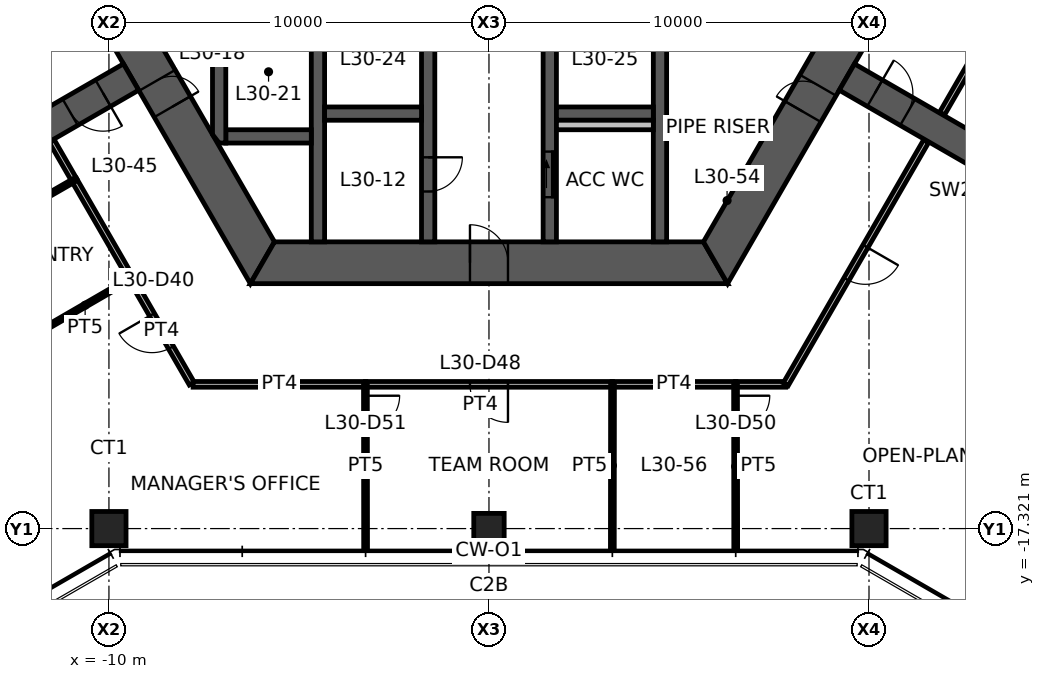
"""IFC4 building model, lengths in metres.
Left out: names, types, materials, properties, quantities, classifications, styles, units other than length and angle.
Written with IfcOpenShell. Run it as: python <this file> out.ifc"""

import sys

from ifc_helpers import new_model, si_unit, direction, frame, frame_2d, origin, origin_2d, place, context, subcontext, project, spatial, polyline, rectangle, hollow_rectangle, outline, extrude, element, fill, save


model = new_model("IFC4")
c1 = context("Model", 3, precision=1e-05, world=origin(), true_north=direction((0.0, 1.0)))
c2 = subcontext(c1, "Body", "Model", "MODEL_VIEW")
j1 = project(units=[si_unit("LENGTHUNIT", "METRE"), si_unit("PLANEANGLEUNIT", "RADIAN")], contexts=[c1])
p1 = place(None, origin())
s1 = spatial("IfcSite", under=j1, at=p1, CompositionType="ELEMENT")
p2 = place(p1, origin())
s2 = spatial("IfcBuilding", under=s1, at=p2, CompositionType="ELEMENT")
p3 = place(p2, frame((0.0, 0.0, 119.7)))
s3 = spatial("IfcBuildingStorey", under=s2, at=p3, CompositionType="ELEMENT", Elevation=119.7)
for number, where, z_axis, x_axis in (
    (1, (-10.0, -17.321, 0.0), (0.0, 0.0, 1.0), (1.0, 0.0, 0.0)),
    (2, (10.0, -17.321, 0.0), (0.0, 0.0, 1.0), (1.0, 0.0, 0.0)),
):
    element("IfcColumn", number, at=place(p3, frame(where, z_axis=z_axis, x_axis=x_axis)), inside=s3, PredefinedType="COLUMN", context=c2, shape_type="SweptSolid", body=[
        extrude(hollow_rectangle(XDim=0.9, YDim=0.9, WallThickness=0.07, at=origin_2d()), origin(), (0.0, 0.0, 1.0), 3.9),
    ])
p4 = place(p3, frame((0.0, -17.321, 0.0), z_axis=(0.0, 0.0, 1.0), x_axis=(1.0, 0.0, 0.0)))
e3 = element("IfcColumn", 3, at=p4, inside=s3, PredefinedType="COLUMN", context=c2, shape_type="SweptSolid", body=[
    extrude(hollow_rectangle(XDim=0.8, YDim=0.8, WallThickness=0.045, at=origin_2d()), origin(), (0.0, 0.0, 1.0), 3.9),
])
p5 = place(p3, frame((-11.922, 0.0, 0.0), z_axis=(0.0, 0.0, 1.0), x_axis=(0.500004296715, -0.866022923061, 0.0)))
e4 = element("IfcWall", 4, at=p5, inside=s3, PredefinedType="SHEAR", context=c2, shape_type="SweptSolid", body=[
    extrude(outline(polyline([(-0.318, -0.55), (6.381, -0.55), (7.181, -0.55), (12.24, -0.55), (11.605, 0.55), (7.181, 0.55), (6.381, 0.55), (0.318, 0.55), (-0.318, -0.55)])), origin(), (0.0, 0.0, 1.0), 3.9),
])
p6 = place(p5, frame((6.381, 0.0, 0.0)))
e5 = element("IfcOpeningElement", 5, at=p6, cuts=e4, PredefinedType="OPENING", context=c2, shape_type="SweptSolid", body=[
    extrude(rectangle(XDim=0.8, YDim=2.1, at=frame_2d((0.4, 1.05))), frame((0.0, 0.56, 0.0), z_axis=(0.0, -1.0, 0.0), x_axis=(1.0, 0.0, 0.0)), (0.0, 0.0, 1.0), 1.12),
])
p7 = place(p3, frame((-5.961, -10.325, 0.0), z_axis=(0.0, 0.0, 1.0), x_axis=(1.0, 0.0, 0.0)))
e6 = element("IfcWall", 6, at=p7, inside=s3, PredefinedType="SHEAR", context=c2, shape_type="SweptSolid", body=[
    extrude(outline(polyline([(-0.318, -0.55), (5.461, -0.55), (6.461, -0.55), (12.24, -0.55), (11.605, 0.55), (6.461, 0.55), (5.461, 0.55), (0.318, 0.55), (-0.318, -0.55)])), origin(), (0.0, 0.0, 1.0), 3.9),
])
p8 = place(p7, frame((5.461, 0.0, 0.0)))
e7 = element("IfcOpeningElement", 7, at=p8, cuts=e6, PredefinedType="OPENING", context=c2, shape_type="SweptSolid", body=[
    extrude(rectangle(XDim=1.0, YDim=2.1, at=frame_2d((0.5, 1.05))), frame((0.0, 0.56, 0.0), z_axis=(0.0, -1.0, 0.0), x_axis=(1.0, 0.0, 0.0)), (0.0, 0.0, 1.0), 1.12),
])
p9 = place(p3, frame((5.961, -10.325, 0.0), z_axis=(0.0, 0.0, 1.0), x_axis=(0.500004296715, 0.866022923061, 0.0)))
e8 = element("IfcWall", 8, at=p9, inside=s3, PredefinedType="SHEAR", context=c2, shape_type="SweptSolid", body=[
    extrude(outline(polyline([(-0.318, -0.55), (4.594, -0.55), (5.394, -0.55), (12.24, -0.55), (11.605, 0.55), (5.394, 0.55), (4.594, 0.55), (0.318, 0.55), (-0.318, -0.55)])), origin(), (0.0, 0.0, 1.0), 3.9),
])
p10 = place(p9, frame((4.594, 0.0, 0.0)))
e9 = element("IfcOpeningElement", 9, at=p10, cuts=e8, PredefinedType="OPENING", context=c2, shape_type="SweptSolid", body=[
    extrude(rectangle(XDim=0.8, YDim=2.1, at=frame_2d((0.4, 1.05))), frame((0.0, 0.56, 0.0), z_axis=(0.0, -1.0, 0.0), x_axis=(1.0, 0.0, 0.0)), (0.0, 0.0, 1.0), 1.12),
])
p11 = place(p3, frame((-9.418, -5.438, 0.0), z_axis=(0.0, 0.0, 1.0), x_axis=(-0.866029782078, -0.499992416496, 0.0)))
e10 = element("IfcWall", 10, at=p11, inside=s3, PredefinedType="SHEAR", context=c2, shape_type="SweptSolid", body=[
    extrude(rectangle(XDim=7.646, YDim=0.8, at=frame_2d((3.823, 0.0))), origin(), (0.0, 0.0, 1.0), 3.9),
])
p12 = place(p11, frame((0.85, 0.0, 0.0)))
e11 = element("IfcOpeningElement", 11, at=p12, cuts=e10, PredefinedType="OPENING", context=c2, shape_type="SweptSolid", body=[
    extrude(rectangle(XDim=1.0, YDim=2.1, at=frame_2d((0.5, 1.05))), frame((0.0, 0.41, 0.0), z_axis=(0.0, -1.0, 0.0), x_axis=(1.0, 0.0, 0.0)), (0.0, 0.0, 1.0), 0.82),
])
p13 = place(p3, frame((9.418, -5.438, 0.0), z_axis=(0.0, 0.0, 1.0), x_axis=(0.866029782078, -0.499992416496, 0.0)))
e12 = element("IfcWall", 12, at=p13, inside=s3, PredefinedType="SHEAR", context=c2, shape_type="SweptSolid", body=[
    extrude(rectangle(XDim=7.646, YDim=0.8, at=frame_2d((3.823, 0.0))), origin(), (0.0, 0.0, 1.0), 3.9),
])
p14 = place(p13, frame((0.85, 0.0, 0.0)))
e13 = element("IfcOpeningElement", 13, at=p14, cuts=e12, PredefinedType="OPENING", context=c2, shape_type="SweptSolid", body=[
    extrude(rectangle(XDim=1.0, YDim=2.1, at=frame_2d((0.5, 1.05))), frame((0.0, 0.41, 0.0), z_axis=(0.0, -1.0, 0.0), x_axis=(1.0, 0.0, 0.0)), (0.0, 0.0, 1.0), 0.82),
])
p15 = place(p3, frame((-1.6, -3.775, 0.0), z_axis=(0.0, 0.0, 1.0), x_axis=(0.0, -1.0, 0.0)))
e14 = element("IfcWall", 14, at=p15, inside=s3, PredefinedType="SHEAR", context=c2, shape_type="SweptSolid", body=[
    extrude(rectangle(XDim=6.0, YDim=0.35, at=frame_2d((3.0, 0.0))), origin(), (0.0, 0.0, 1.0), 3.9),
])
p16 = place(p15, frame((3.775, 0.0, 0.0)))
e15 = element("IfcOpeningElement", 15, at=p16, cuts=e14, PredefinedType="OPENING", context=c2, shape_type="SweptSolid", body=[
    extrude(rectangle(XDim=0.9, YDim=2.1, at=frame_2d((0.45, 1.05))), frame((0.0, 0.185, 0.0), z_axis=(0.0, -1.0, 0.0), x_axis=(1.0, 0.0, 0.0)), (0.0, 0.0, 1.0), 0.37),
])
p17 = place(p3, frame((1.6, -3.775, 0.0), z_axis=(0.0, 0.0, 1.0), x_axis=(0.0, -1.0, 0.0)))
e16 = element("IfcWall", 16, at=p17, inside=s3, PredefinedType="SHEAR", context=c2, shape_type="SweptSolid", body=[
    extrude(rectangle(XDim=6.0, YDim=0.35, at=frame_2d((3.0, 0.0))), origin(), (0.0, 0.0, 1.0), 3.9),
])
p18 = place(p17, frame((3.625, 0.0, 0.0)))
e17 = element("IfcOpeningElement", 17, at=p18, cuts=e16, PredefinedType="OPENING", context=c2, shape_type="SweptSolid", body=[
    extrude(rectangle(XDim=1.2, YDim=2.1, at=frame_2d((0.6, 1.05))), frame((0.0, 0.185, 0.0), z_axis=(0.0, -1.0, 0.0), x_axis=(1.0, 0.0, 0.0)), (0.0, 0.0, 1.0), 0.37),
])
for number, where, z_axis, x_axis in (
    (18, (-4.5, -3.775, 0.0), (0.0, 0.0, 1.0), (0.0, -1.0, 0.0)),
    (19, (4.5, -3.775, 0.0), (0.0, 0.0, 1.0), (0.0, -1.0, 0.0)),
):
    element("IfcWall", number, at=place(p3, frame(where, z_axis=z_axis, x_axis=x_axis)), inside=s3, PredefinedType="SHEAR", context=c2, shape_type="SweptSolid", body=[
        extrude(rectangle(XDim=6.0, YDim=0.35, at=frame_2d((3.0, 0.0))), origin(), (0.0, 0.0, 1.0), 3.9),
    ])
for number, where, z_axis, x_axis in (
    (20, (-4.325, -6.4, 0.0), (0.0, 0.0, 1.0), (1.0, 0.0, 0.0)),
    (21, (1.775, -6.4, 0.0), (0.0, 0.0, 1.0), (1.0, 0.0, 0.0)),
):
    element("IfcWall", number, at=place(p3, frame(where, z_axis=z_axis, x_axis=x_axis)), inside=s3, PredefinedType="SHEAR", context=c2, shape_type="SweptSolid", body=[
        extrude(rectangle(XDim=2.55, YDim=0.35, at=frame_2d((1.275, 0.0))), origin(), (0.0, 0.0, 1.0), 3.9),
    ])
p19 = place(p3, frame((-6.925, -7.0, 0.0), z_axis=(0.0, 0.0, 1.0), x_axis=(1.0, 0.0, 0.0)))
e22 = element("IfcWall", 22, at=p19, inside=s3, PredefinedType="SHEAR", context=c2, shape_type="SweptSolid", body=[
    extrude(rectangle(XDim=2.25, YDim=0.35, at=frame_2d((1.125, 0.0))), origin(), (0.0, 0.0, 1.0), 3.9),
])
p20 = place(p3, frame((-7.1, -3.775, 0.0), z_axis=(0.0, 0.0, 1.0), x_axis=(0.0, -1.0, 0.0)))
e23 = element("IfcWall", 23, at=p20, inside=s3, PredefinedType="SHEAR", context=c2, shape_type="SweptSolid", body=[
    extrude(outline(polyline([(0.0, -0.175), (3.175, -0.175), (3.4, 0.0), (3.4, 0.175), (0.0, 0.175), (0.0, -0.175)])), origin(), (0.0, 0.0, 1.0), 3.9),
])
p21 = place(p3, frame((1.775, -6.7, 0.0), z_axis=(0.0, 0.0, 1.0), x_axis=(1.0, 0.0, 0.0)))
e24 = element("IfcWall", 24, at=p21, inside=s3, PredefinedType="PLUMBINGWALL", context=c2, shape_type="SweptSolid", body=[
    extrude(rectangle(XDim=2.55, YDim=0.25, at=frame_2d((1.275, 0.0))), origin(), (0.0, 0.0, 1.0), 3.9),
])
p22 = place(p3, frame((-9.41, -10.75, 0.0), z_axis=(0.0, 0.0, 1.0), x_axis=(-0.500038395149, 0.8660032352, 0.0)))
e25 = element("IfcWall", 25, at=p22, inside=s3, PredefinedType="PARTITIONING", context=c2, shape_type="SweptSolid", body=[
    extrude(rectangle(XDim=3.01, YDim=0.15, at=frame_2d((1.505, 0.0))), origin(), (0.0, 0.0, 1.0), 2.35),
])
p23 = place(p3, frame((-10.911, -8.152, 0.0), z_axis=(0.0, 0.0, 1.0), x_axis=(-0.499841408252, 0.866116947413, 0.0)))
e26 = element("IfcWall", 26, at=p23, inside=s3, PredefinedType="PARTITIONING", context=c2, shape_type="SweptSolid", body=[
    extrude(rectangle(XDim=1.185, YDim=0.15, at=frame_2d((0.592, 0.0))), origin(), (0.0, 0.0, 1.0), 2.35),
])
p24 = place(p3, frame((-7.82, -13.505, 0.0), z_axis=(0.0, 0.0, 1.0), x_axis=(-0.499983030129, 0.866035201123, 0.0)))
e27 = element("IfcWall", 27, at=p24, inside=s3, PredefinedType="PARTITIONING", context=c2, shape_type="SweptSolid", body=[
    extrude(rectangle(XDim=3.19, YDim=0.15, at=frame_2d((1.595, 0.0))), origin(), (0.0, 0.0, 1.0), 2.35),
])
p25 = place(p24, frame((1.095, 0.0, 0.0)))
e28 = element("IfcOpeningElement", 28, at=p25, cuts=e27, PredefinedType="OPENING", context=c2, shape_type="SweptSolid", body=[
    extrude(rectangle(XDim=1.0, YDim=2.1, at=frame_2d((0.5, 1.05))), frame((0.0, 0.085, 0.0), z_axis=(0.0, -1.0, 0.0), x_axis=(1.0, 0.0, 0.0)), (0.0, 0.0, 1.0), 0.17),
])
p26 = place(p3, frame((-13.338, -9.548, 0.0), z_axis=(0.0, 0.0, 1.0), x_axis=(0.866833758708, 0.498597267105, 0.0)))
e29 = element("IfcWall", 29, at=p26, inside=s3, PredefinedType="PARTITIONING", context=c2, shape_type="SweptSolid", body=[
    extrude(rectangle(XDim=2.8, YDim=0.1, at=frame_2d((1.4, 0.0))), origin(), (0.0, 0.0, 1.0), 2.35),
])
p27 = place(p3, frame((-9.415, -10.742, 0.0), z_axis=(0.0, 0.0, 1.0), x_axis=(-0.865195372903, -0.501434907746, 0.0)))
e30 = element("IfcWall", 30, at=p27, inside=s3, PredefinedType="PARTITIONING", context=c2, shape_type="SweptSolid", body=[
    extrude(rectangle(XDim=2.8, YDim=0.1, at=frame_2d((1.4, 0.0))), origin(), (0.0, 0.0, 1.0), 2.35),
])
p28 = place(p3, frame((15.606, -0.02, 0.0), z_axis=(0.0, 0.0, 1.0), x_axis=(-0.499989298045, -0.866031582473, 0.0)))
e31 = element("IfcWall", 31, at=p28, inside=s3, PredefinedType="PARTITIONING", context=c2, shape_type="SweptSolid", body=[
    extrude(rectangle(XDim=7.365, YDim=0.15, at=frame_2d((3.683, 0.0))), origin(), (0.0, 0.0, 1.0), 2.35),
])
p29 = place(p28, frame((3.183, 0.0, 0.0)))
e32 = element("IfcOpeningElement", 32, at=p29, cuts=e31, PredefinedType="OPENING", context=c2, shape_type="SweptSolid", body=[
    extrude(rectangle(XDim=1.0, YDim=2.1, at=frame_2d((0.5, 1.05))), frame((0.0, 0.085, 0.0), z_axis=(0.0, -1.0, 0.0), x_axis=(1.0, 0.0, 0.0)), (0.0, 0.0, 1.0), 0.17),
])
p30 = place(p3, frame((6.498, -13.525, 0.0), z_axis=(0.0, 0.0, 1.0), x_axis=(-1.0, 0.0, 0.0)))
e33 = element("IfcWall", 33, at=p30, inside=s3, PredefinedType="PARTITIONING", context=c2, shape_type="SweptSolid", body=[
    extrude(rectangle(XDim=3.256, YDim=0.15, at=frame_2d((1.628, 0.0))), origin(), (0.0, 0.0, 1.0), 2.35),
])
p31 = place(p3, frame((-3.241, -13.525, 0.0), z_axis=(0.0, 0.0, 1.0), x_axis=(-1.0, 0.0, 0.0)))
e34 = element("IfcWall", 34, at=p31, inside=s3, PredefinedType="PARTITIONING", context=c2, shape_type="SweptSolid", body=[
    extrude(rectangle(XDim=4.544, YDim=0.15, at=frame_2d((2.272, 0.0))), origin(), (0.0, 0.0, 1.0), 2.35),
])
p32 = place(p3, frame((7.809, -13.525, 0.0), z_axis=(0.0, 0.0, 1.0), x_axis=(-1.0, 0.0, 0.0)))
e35 = element("IfcWall", 35, at=p32, inside=s3, PredefinedType="PARTITIONING", context=c2, shape_type="SweptSolid", body=[
    extrude(rectangle(XDim=1.32, YDim=0.15, at=frame_2d((0.66, 0.0))), origin(), (0.0, 0.0, 1.0), 2.35),
])
p33 = place(p3, frame((11.503, -7.126, 0.0), z_axis=(0.0, 0.0, 1.0), x_axis=(-0.500005620463, -0.866022158784, 0.0)))
e36 = element("IfcWall", 36, at=p33, inside=s3, PredefinedType="PARTITIONING", context=c2, shape_type="SweptSolid", body=[
    extrude(rectangle(XDim=7.389, YDim=0.15, at=frame_2d((3.694, 0.0))), origin(), (0.0, 0.0, 1.0), 2.35),
])
p34 = place(p33, frame((3.194, 0.0, 0.0)))
e37 = element("IfcOpeningElement", 37, at=p34, cuts=e36, PredefinedType="OPENING", context=c2, shape_type="SweptSolid", body=[
    extrude(rectangle(XDim=1.0, YDim=2.1, at=frame_2d((0.5, 1.05))), frame((0.0, 0.085, 0.0), z_axis=(0.0, -1.0, 0.0), x_axis=(1.0, 0.0, 0.0)), (0.0, 0.0, 1.0), 0.17),
])
p35 = place(p3, frame((3.251, -13.525, 0.0), z_axis=(0.0, 0.0, 1.0), x_axis=(-1.0, 0.0, 0.0)))
e38 = element("IfcWall", 38, at=p35, inside=s3, PredefinedType="PARTITIONING", context=c2, shape_type="SweptSolid", body=[
    extrude(rectangle(XDim=6.502, YDim=0.15, at=frame_2d((3.251, 0.0))), origin(), (0.0, 0.0, 1.0), 2.35),
])
p36 = place(p35, frame((2.751, 0.0, 0.0)))
e39 = element("IfcOpeningElement", 39, at=p36, cuts=e38, PredefinedType="OPENING", context=c2, shape_type="SweptSolid", body=[
    extrude(rectangle(XDim=1.0, YDim=2.1, at=frame_2d((0.5, 1.05))), frame((0.0, 0.085, 0.0), z_axis=(0.0, -1.0, 0.0), x_axis=(1.0, 0.0, 0.0)), (0.0, 0.0, 1.0), 0.17),
])
p37 = place(p3, frame((6.488, -13.525, 0.0), z_axis=(0.0, 0.0, 1.0), x_axis=(0.00107362768, -0.999999423662, 0.0)))
e40 = element("IfcWall", 40, at=p37, inside=s3, PredefinedType="PARTITIONING", context=c2, shape_type="SweptSolid", body=[
    extrude(rectangle(XDim=4.321, YDim=0.1, at=frame_2d((2.16, 0.0))), origin(), (0.0, 0.0, 1.0), 2.35),
])
p38 = place(p37, frame((0.3, 0.0, 0.0)))
e41 = element("IfcOpeningElement", 41, at=p38, cuts=e40, PredefinedType="OPENING", context=c2, shape_type="SweptSolid", body=[
    extrude(rectangle(XDim=0.9, YDim=2.1, at=frame_2d((0.45, 1.05))), frame((0.0, 0.06, 0.0), z_axis=(0.0, -1.0, 0.0), x_axis=(1.0, 0.0, 0.0)), (0.0, 0.0, 1.0), 0.12),
])
p39 = place(p3, frame((3.246, -17.801, 0.0), z_axis=(0.0, 0.0, 1.0), x_axis=(0.001084907715, 0.999999411487, 0.0)))
e42 = element("IfcWall", 42, at=p39, inside=s3, PredefinedType="PARTITIONING", context=c2, shape_type="SweptSolid", body=[
    extrude(rectangle(XDim=4.276, YDim=0.1, at=frame_2d((2.138, 0.0))), origin(), (0.0, 0.0, 1.0), 2.35),
])
p40 = place(p3, frame((-3.251, -13.525, 0.0), z_axis=(0.0, 0.0, 1.0), x_axis=(0.00107362768, -0.999999423662, 0.0)))
e43 = element("IfcWall", 43, at=p40, inside=s3, PredefinedType="PARTITIONING", context=c2, shape_type="SweptSolid", body=[
    extrude(rectangle(XDim=4.321, YDim=0.1, at=frame_2d((2.16, 0.0))), origin(), (0.0, 0.0, 1.0), 2.35),
])
p41 = place(p40, frame((0.3, 0.0, 0.0)))
e44 = element("IfcOpeningElement", 44, at=p41, cuts=e43, PredefinedType="OPENING", context=c2, shape_type="SweptSolid", body=[
    extrude(rectangle(XDim=0.9, YDim=2.1, at=frame_2d((0.45, 1.05))), frame((0.0, 0.06, 0.0), z_axis=(0.0, -1.0, 0.0), x_axis=(1.0, 0.0, 0.0)), (0.0, 0.0, 1.0), 0.12),
])
p42 = place(p8, origin())
e45 = element("IfcDoor", 45, at=p42, inside=s3, OperationType="SINGLE_SWING_LEFT", PredefinedType="DOOR", context=c2, shape_type="SweptSolid", body=[
    extrude(rectangle(XDim=1.0, YDim=2.1, at=frame_2d((0.5, 1.05))), frame((0.0, 0.025, 0.0), z_axis=(0.0, -1.0, 0.0), x_axis=(1.0, 0.0, 0.0)), (0.0, 0.0, 1.0), 0.05),
])
fill(e7, e45)
p43 = place(p10, origin())
e46 = element("IfcDoor", 46, at=p43, inside=s3, OperationType="SINGLE_SWING_LEFT", PredefinedType="DOOR", context=c2, shape_type="SweptSolid", body=[
    extrude(rectangle(XDim=0.8, YDim=2.1, at=frame_2d((0.4, 1.05))), frame((0.0, 0.025, 0.0), z_axis=(0.0, -1.0, 0.0), x_axis=(1.0, 0.0, 0.0)), (0.0, 0.0, 1.0), 0.05),
])
fill(e9, e46)
p44 = place(p6, origin())
e47 = element("IfcDoor", 47, at=p44, inside=s3, OperationType="SINGLE_SWING_RIGHT", PredefinedType="DOOR", context=c2, shape_type="SweptSolid", body=[
    extrude(rectangle(XDim=0.8, YDim=2.1, at=frame_2d((0.4, 1.05))), frame((0.0, 0.025, 0.0), z_axis=(0.0, -1.0, 0.0), x_axis=(1.0, 0.0, 0.0)), (0.0, 0.0, 1.0), 0.05),
])
fill(e5, e47)
p45 = place(p18, origin())
e48 = element("IfcDoor", 48, at=p45, inside=s3, OperationType="SLIDING_TO_LEFT", PredefinedType="DOOR", context=c2, shape_type="SweptSolid", body=[
    extrude(rectangle(XDim=1.2, YDim=2.1, at=frame_2d((0.6, 1.05))), frame((0.0, 0.025, 0.0), z_axis=(0.0, -1.0, 0.0), x_axis=(1.0, 0.0, 0.0)), (0.0, 0.0, 1.0), 0.05),
])
fill(e17, e48)
p46 = place(p16, origin())
e49 = element("IfcDoor", 49, at=p46, inside=s3, OperationType="SINGLE_SWING_LEFT", PredefinedType="DOOR", context=c2, shape_type="SweptSolid", body=[
    extrude(rectangle(XDim=0.9, YDim=2.1, at=frame_2d((0.45, 1.05))), frame((0.0, 0.025, 0.0), z_axis=(0.0, -1.0, 0.0), x_axis=(1.0, 0.0, 0.0)), (0.0, 0.0, 1.0), 0.05),
])
fill(e15, e49)
p47 = place(p12, origin())
e50 = element("IfcDoor", 50, at=p47, inside=s3, OperationType="SINGLE_SWING_LEFT", PredefinedType="DOOR", context=c2, shape_type="SweptSolid", body=[
    extrude(rectangle(XDim=1.0, YDim=2.1, at=frame_2d((0.5, 1.05))), frame((0.0, 0.025, 0.0), z_axis=(0.0, -1.0, 0.0), x_axis=(1.0, 0.0, 0.0)), (0.0, 0.0, 1.0), 0.05),
])
fill(e11, e50)
p48 = place(p14, origin())
e51 = element("IfcDoor", 51, at=p48, inside=s3, OperationType="SINGLE_SWING_LEFT", PredefinedType="DOOR", context=c2, shape_type="SweptSolid", body=[
    extrude(rectangle(XDim=1.0, YDim=2.1, at=frame_2d((0.5, 1.05))), frame((0.0, 0.025, 0.0), z_axis=(0.0, -1.0, 0.0), x_axis=(1.0, 0.0, 0.0)), (0.0, 0.0, 1.0), 0.05),
])
fill(e13, e51)
p49 = place(p25, origin())
e52 = element("IfcDoor", 52, at=p49, inside=s3, OperationType="SINGLE_SWING_RIGHT", PredefinedType="DOOR", context=c2, shape_type="SweptSolid", body=[
    extrude(rectangle(XDim=1.0, YDim=2.1, at=frame_2d((0.5, 1.05))), frame((0.0, 0.025, 0.0), z_axis=(0.0, -1.0, 0.0), x_axis=(1.0, 0.0, 0.0)), (0.0, 0.0, 1.0), 0.05),
])
fill(e28, e52)
p50 = place(p34, origin())
e53 = element("IfcDoor", 53, at=p50, inside=s3, OperationType="SINGLE_SWING_LEFT", PredefinedType="DOOR", context=c2, shape_type="SweptSolid", body=[
    extrude(rectangle(XDim=1.0, YDim=2.1, at=frame_2d((0.5, 1.05))), frame((0.0, 0.025, 0.0), z_axis=(0.0, -1.0, 0.0), x_axis=(1.0, 0.0, 0.0)), (0.0, 0.0, 1.0), 0.05),
])
fill(e37, e53)
p51 = place(p36, origin())
e54 = element("IfcDoor", 54, at=p51, inside=s3, OperationType="SINGLE_SWING_LEFT", PredefinedType="DOOR", context=c2, shape_type="SweptSolid", body=[
    extrude(rectangle(XDim=1.0, YDim=2.1, at=frame_2d((0.5, 1.05))), frame((0.0, 0.025, 0.0), z_axis=(0.0, -1.0, 0.0), x_axis=(1.0, 0.0, 0.0)), (0.0, 0.0, 1.0), 0.05),
])
fill(e39, e54)
p52 = place(p38, origin())
e55 = element("IfcDoor", 55, at=p52, inside=s3, OperationType="SINGLE_SWING_LEFT", PredefinedType="DOOR", context=c2, shape_type="SweptSolid", body=[
    extrude(rectangle(XDim=0.9, YDim=2.1, at=frame_2d((0.45, 1.05))), frame((0.0, 0.025, 0.0), z_axis=(0.0, -1.0, 0.0), x_axis=(1.0, 0.0, 0.0)), (0.0, 0.0, 1.0), 0.05),
])
fill(e41, e55)
p53 = place(p41, origin())
e56 = element("IfcDoor", 56, at=p53, inside=s3, OperationType="SINGLE_SWING_LEFT", PredefinedType="DOOR", context=c2, shape_type="SweptSolid", body=[
    extrude(rectangle(XDim=0.9, YDim=2.1, at=frame_2d((0.45, 1.05))), frame((0.0, 0.025, 0.0), z_axis=(0.0, -1.0, 0.0), x_axis=(1.0, 0.0, 0.0)), (0.0, 0.0, 1.0), 0.05),
])
fill(e44, e56)
save(model, sys.argv[1])
